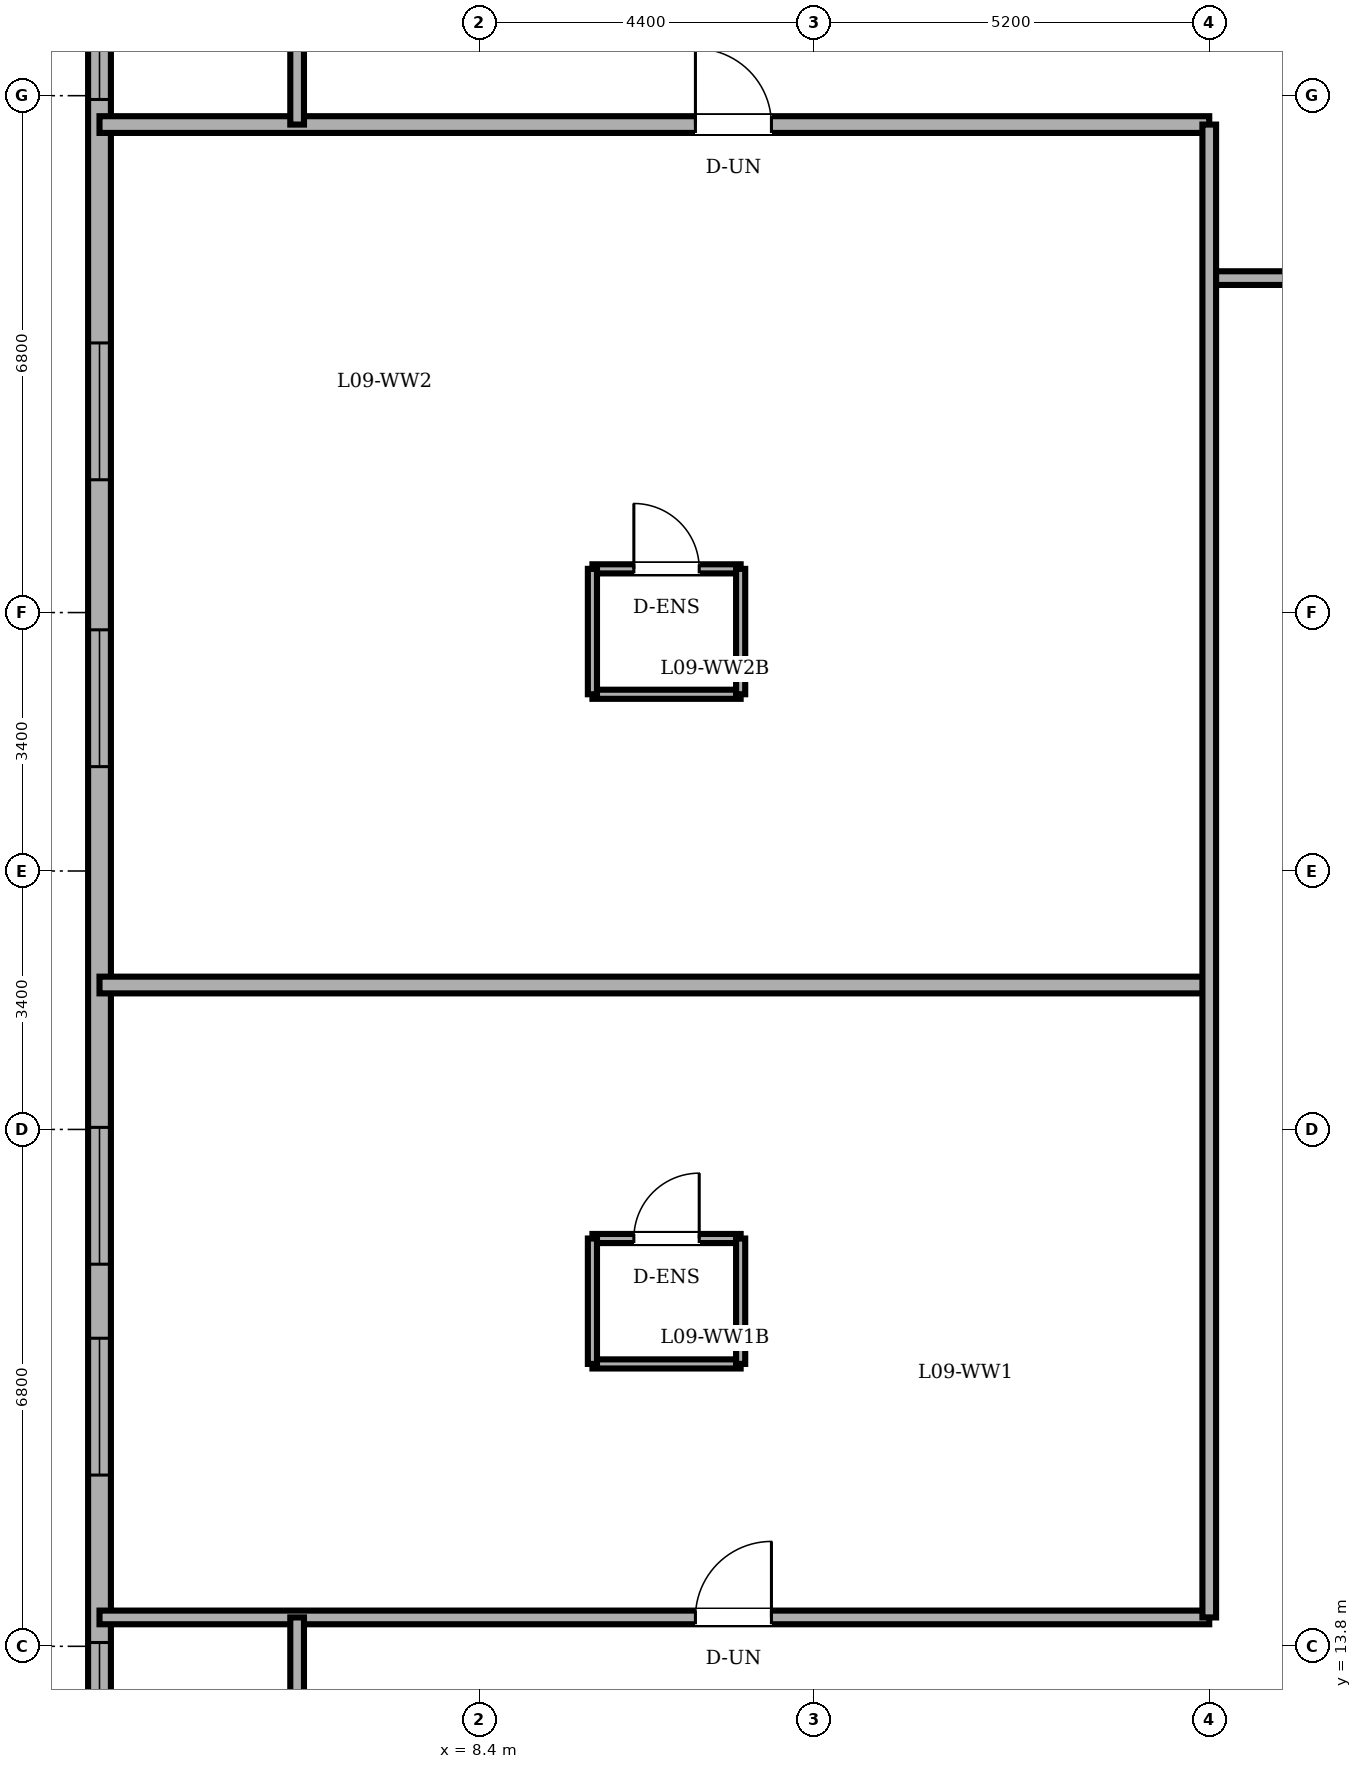
"""IFC4 building model, lengths in metres.
Left out: names, types, materials, properties, quantities, classifications, styles, units other than length and angle.
Written with IfcOpenShell. Run it as: python <this file> out.ifc"""

import sys

from ifc_helpers import new_model, si_unit, direction, frame, frame_2d, origin, place, context, subcontext, project, spatial, rectangle, extrude, element, fill, save


model = new_model("IFC4")
c1 = context("Model", 3, precision=1e-05, world=origin(), true_north=direction((0.0, 1.0)))
c2 = subcontext(c1, "Body", "Model", "MODEL_VIEW")
j1 = project(units=[si_unit("LENGTHUNIT", "METRE"), si_unit("PLANEANGLEUNIT", "RADIAN")], contexts=[c1])
p1 = place(None, origin())
s1 = spatial("IfcSite", under=j1, at=p1, CompositionType="ELEMENT")
p2 = place(p1, origin())
s2 = spatial("IfcBuilding", under=s1, at=p2, CompositionType="ELEMENT")
p3 = place(p2, frame((0.0, 0.0, 36.0)))
s3 = spatial("IfcBuildingStorey", under=s2, at=p3, CompositionType="ELEMENT", Elevation=36.0)
p4 = place(p3, frame((3.4, 40.2, 0.0), z_axis=(0.0, 0.0, 1.0), x_axis=(0.0, -1.0, 0.0)))
e1 = element("IfcWall", 1, at=p4, inside=s3, PredefinedType="SOLIDWALL", context=c2, shape_type="SweptSolid", body=[
    extrude(rectangle(XDim=32.4, YDim=0.3, at=frame_2d((16.2, 0.0))), origin(), (0.0, 0.0, 1.0), 3.4),
])
p5 = place(p4, frame((1.235, 0.0, 0.85)))
e2 = element("IfcOpeningElement", 2, at=p5, cuts=e1, PredefinedType="OPENING", context=c2, shape_type="SweptSolid", body=[
    extrude(rectangle(XDim=1.8, YDim=1.55, at=frame_2d((0.9, 0.775))), frame((0.0, 0.16, 0.0), z_axis=(0.0, -1.0, 0.0), x_axis=(1.0, 0.0, 0.0)), (0.0, 0.0, 1.0), 0.32),
])
p6 = place(p4, frame((4.25, 0.0, 0.85)))
e3 = element("IfcOpeningElement", 3, at=p6, cuts=e1, PredefinedType="OPENING", context=c2, shape_type="SweptSolid", body=[
    extrude(rectangle(XDim=1.8, YDim=1.55, at=frame_2d((0.9, 0.775))), frame((0.0, 0.16, 0.0), z_axis=(0.0, -1.0, 0.0), x_axis=(1.0, 0.0, 0.0)), (0.0, 0.0, 1.0), 0.32),
])
p7 = place(p4, frame((9.253, 0.0, 0.85)))
e4 = element("IfcOpeningElement", 4, at=p7, cuts=e1, PredefinedType="OPENING", context=c2, shape_type="SweptSolid", body=[
    extrude(rectangle(XDim=1.8, YDim=1.55, at=frame_2d((0.9, 0.775))), frame((0.0, 0.16, 0.0), z_axis=(0.0, -1.0, 0.0), x_axis=(1.0, 0.0, 0.0)), (0.0, 0.0, 1.0), 0.32),
])
p8 = place(p4, frame((13.027, 0.0, 0.85)))
e5 = element("IfcOpeningElement", 5, at=p8, cuts=e1, PredefinedType="OPENING", context=c2, shape_type="SweptSolid", body=[
    extrude(rectangle(XDim=1.8, YDim=1.55, at=frame_2d((0.9, 0.775))), frame((0.0, 0.16, 0.0), z_axis=(0.0, -1.0, 0.0), x_axis=(1.0, 0.0, 0.0)), (0.0, 0.0, 1.0), 0.32),
])
p9 = place(p4, frame((19.573, 0.0, 0.85)))
e6 = element("IfcOpeningElement", 6, at=p9, cuts=e1, PredefinedType="OPENING", context=c2, shape_type="SweptSolid", body=[
    extrude(rectangle(XDim=1.8, YDim=1.55, at=frame_2d((0.9, 0.775))), frame((0.0, 0.16, 0.0), z_axis=(0.0, -1.0, 0.0), x_axis=(1.0, 0.0, 0.0)), (0.0, 0.0, 1.0), 0.32),
])
p10 = place(p4, frame((22.347, 0.0, 0.85)))
e7 = element("IfcOpeningElement", 7, at=p10, cuts=e1, PredefinedType="OPENING", context=c2, shape_type="SweptSolid", body=[
    extrude(rectangle(XDim=1.8, YDim=1.55, at=frame_2d((0.9, 0.775))), frame((0.0, 0.16, 0.0), z_axis=(0.0, -1.0, 0.0), x_axis=(1.0, 0.0, 0.0)), (0.0, 0.0, 1.0), 0.32),
])
p11 = place(p4, frame((26.35, 0.0, 0.85)))
e8 = element("IfcOpeningElement", 8, at=p11, cuts=e1, PredefinedType="OPENING", context=c2, shape_type="SweptSolid", body=[
    extrude(rectangle(XDim=1.8, YDim=1.55, at=frame_2d((0.9, 0.775))), frame((0.0, 0.16, 0.0), z_axis=(0.0, -1.0, 0.0), x_axis=(1.0, 0.0, 0.0)), (0.0, 0.0, 1.0), 0.32),
])
p12 = place(p4, frame((29.365, 0.0, 0.85)))
e9 = element("IfcOpeningElement", 9, at=p12, cuts=e1, PredefinedType="OPENING", context=c2, shape_type="SweptSolid", body=[
    extrude(rectangle(XDim=1.8, YDim=1.55, at=frame_2d((0.9, 0.775))), frame((0.0, 0.16, 0.0), z_axis=(0.0, -1.0, 0.0), x_axis=(1.0, 0.0, 0.0)), (0.0, 0.0, 1.0), 0.32),
])
p13 = place(p3, frame((9.885, 19.165, 0.0), z_axis=(0.0, 0.0, 1.0), x_axis=(1.0, 0.0, 0.0)))
e10 = element("IfcWall", 10, at=p13, inside=s3, PredefinedType="PARTITIONING", context=c2, shape_type="SweptSolid", body=[
    extrude(rectangle(XDim=1.95, YDim=0.12, at=frame_2d((0.975, 0.0))), origin(), (0.0, 0.0, 1.0), 3.4),
])
p14 = place(p13, frame((0.545, 0.0, 0.0)))
e11 = element("IfcOpeningElement", 11, at=p14, cuts=e10, PredefinedType="OPENING", context=c2, shape_type="SweptSolid", body=[
    extrude(rectangle(XDim=0.86, YDim=2.1, at=frame_2d((0.43, 1.05))), frame((0.0, 0.07, 0.0), z_axis=(0.0, -1.0, 0.0), x_axis=(1.0, 0.0, 0.0)), (0.0, 0.0, 1.0), 0.14),
])
p15 = place(p3, frame((11.835, 17.515, 0.0), z_axis=(0.0, 0.0, 1.0), x_axis=(-1.0, 0.0, 0.0)))
e12 = element("IfcWall", 12, at=p15, inside=s3, PredefinedType="PARTITIONING", context=c2, shape_type="SweptSolid", body=[
    extrude(rectangle(XDim=1.95, YDim=0.12, at=frame_2d((0.975, 0.0))), origin(), (0.0, 0.0, 1.0), 3.4),
])
for number, where, z_axis, x_axis in (
    (13, (9.885, 19.165, 0.0), (0.0, 0.0, 1.0), (0.0, -1.0, 0.0)),
    (14, (11.835, 17.515, 0.0), (0.0, 0.0, 1.0), (0.0, 1.0, 0.0)),
):
    element("IfcWall", number, at=place(p3, frame(where, z_axis=z_axis, x_axis=x_axis)), inside=s3, PredefinedType="PARTITIONING", context=c2, shape_type="SweptSolid", body=[
        extrude(rectangle(XDim=1.65, YDim=0.12, at=frame_2d((0.825, 0.0))), origin(), (0.0, 0.0, 1.0), 3.4),
    ])
p16 = place(p3, frame((9.885, 27.975, 0.0), z_axis=(0.0, 0.0, 1.0), x_axis=(1.0, 0.0, 0.0)))
e15 = element("IfcWall", 15, at=p16, inside=s3, PredefinedType="PARTITIONING", context=c2, shape_type="SweptSolid", body=[
    extrude(rectangle(XDim=1.95, YDim=0.12, at=frame_2d((0.975, 0.0))), origin(), (0.0, 0.0, 1.0), 3.4),
])
p17 = place(p16, frame((0.545, 0.0, 0.0)))
e16 = element("IfcOpeningElement", 16, at=p17, cuts=e15, PredefinedType="OPENING", context=c2, shape_type="SweptSolid", body=[
    extrude(rectangle(XDim=0.86, YDim=2.1, at=frame_2d((0.43, 1.05))), frame((0.0, 0.07, 0.0), z_axis=(0.0, -1.0, 0.0), x_axis=(1.0, 0.0, 0.0)), (0.0, 0.0, 1.0), 0.14),
])
p18 = place(p3, frame((11.835, 26.325, 0.0), z_axis=(0.0, 0.0, 1.0), x_axis=(-1.0, 0.0, 0.0)))
e17 = element("IfcWall", 17, at=p18, inside=s3, PredefinedType="PARTITIONING", context=c2, shape_type="SweptSolid", body=[
    extrude(rectangle(XDim=1.95, YDim=0.12, at=frame_2d((0.975, 0.0))), origin(), (0.0, 0.0, 1.0), 3.4),
])
for number, where, z_axis, x_axis in (
    (18, (9.885, 27.975, 0.0), (0.0, 0.0, 1.0), (0.0, -1.0, 0.0)),
    (19, (11.835, 26.325, 0.0), (0.0, 0.0, 1.0), (0.0, 1.0, 0.0)),
):
    element("IfcWall", number, at=place(p3, frame(where, z_axis=z_axis, x_axis=x_axis)), inside=s3, PredefinedType="PARTITIONING", context=c2, shape_type="SweptSolid", body=[
        extrude(rectangle(XDim=1.65, YDim=0.12, at=frame_2d((0.825, 0.0))), origin(), (0.0, 0.0, 1.0), 3.4),
    ])
p19 = place(p3, frame((3.4, 14.18, 0.0), z_axis=(0.0, 0.0, 1.0), x_axis=(1.0, 0.0, 0.0)))
e20 = element("IfcWall", 20, at=p19, inside=s3, PredefinedType="PARTITIONING", context=c2, shape_type="SweptSolid", body=[
    extrude(rectangle(XDim=14.6, YDim=0.18, at=frame_2d((7.3, 0.0))), origin(), (0.0, 0.0, 1.0), 3.4),
])
p20 = place(p19, frame((7.84, 0.0, 0.0)))
e21 = element("IfcOpeningElement", 21, at=p20, cuts=e20, PredefinedType="OPENING", context=c2, shape_type="SweptSolid", body=[
    extrude(rectangle(XDim=1.0, YDim=2.15, at=frame_2d((0.5, 1.075))), frame((0.0, 0.1, 0.0), z_axis=(0.0, -1.0, 0.0), x_axis=(1.0, 0.0, 0.0)), (0.0, 0.0, 1.0), 0.2),
])
p21 = place(p3, frame((3.4, 22.5, 0.0), z_axis=(0.0, 0.0, 1.0), x_axis=(1.0, 0.0, 0.0)))
e22 = element("IfcWall", 22, at=p21, inside=s3, PredefinedType="PARTITIONING", context=c2, shape_type="SweptSolid", body=[
    extrude(rectangle(XDim=14.6, YDim=0.22, at=frame_2d((7.3, 0.0))), origin(), (0.0, 0.0, 1.0), 3.4),
])
p22 = place(p3, frame((18.0, 31.8, 0.0), z_axis=(0.0, 0.0, 1.0), x_axis=(1.0, 0.0, 0.0)))
e23 = element("IfcWall", 23, at=p22, inside=s3, PredefinedType="PARTITIONING", context=c2, shape_type="SweptSolid", body=[
    extrude(rectangle(XDim=2.35, YDim=0.18, at=frame_2d((1.175, 0.0))), origin(), (0.0, 0.0, 1.0), 3.4),
])
p23 = place(p3, frame((3.4, 33.82, 0.0), z_axis=(0.0, 0.0, 1.0), x_axis=(1.0, 0.0, 0.0)))
e24 = element("IfcWall", 24, at=p23, inside=s3, PredefinedType="PARTITIONING", context=c2, shape_type="SweptSolid", body=[
    extrude(rectangle(XDim=14.6, YDim=0.22, at=frame_2d((7.3, 0.0))), origin(), (0.0, 0.0, 1.0), 3.4),
])
p24 = place(p23, frame((7.84, 0.0, 0.0)))
e25 = element("IfcOpeningElement", 25, at=p24, cuts=e24, PredefinedType="OPENING", context=c2, shape_type="SweptSolid", body=[
    extrude(rectangle(XDim=1.0, YDim=2.15, at=frame_2d((0.5, 1.075))), frame((0.0, 0.12, 0.0), z_axis=(0.0, -1.0, 0.0), x_axis=(1.0, 0.0, 0.0)), (0.0, 0.0, 1.0), 0.24),
])
for number, where, z_axis, x_axis in (
    (26, (6.0, 11.72, 0.0), (0.0, 0.0, 1.0), (0.0, 1.0, 0.0)),
    (27, (6.0, 33.82, 0.0), (0.0, 0.0, 1.0), (0.0, 1.0, 0.0)),
):
    element("IfcWall", number, at=place(p3, frame(where, z_axis=z_axis, x_axis=x_axis)), inside=s3, PredefinedType="PARTITIONING", context=c2, shape_type="SweptSolid", body=[
        extrude(rectangle(XDim=2.46, YDim=0.18, at=frame_2d((1.23, 0.0))), origin(), (0.0, 0.0, 1.0), 3.4),
    ])
p25 = place(p3, frame((18.0, 14.18, 0.0), z_axis=(0.0, 0.0, 1.0), x_axis=(0.0, 1.0, 0.0)))
e28 = element("IfcWall", 28, at=p25, inside=s3, PredefinedType="PARTITIONING", context=c2, shape_type="SweptSolid", body=[
    extrude(rectangle(XDim=19.64, YDim=0.18, at=frame_2d((9.82, 0.0))), origin(), (0.0, 0.0, 1.0), 3.4),
])
p26 = place(p6, origin())
e29 = element("IfcWindow", 29, at=p26, inside=s3, PartitioningType="DOUBLE_PANEL_VERTICAL", PredefinedType="WINDOW", context=c2, shape_type="SweptSolid", body=[
    extrude(rectangle(XDim=1.8, YDim=1.55, at=frame_2d((0.9, 0.775))), frame((0.0, 0.03, 0.0), z_axis=(0.0, -1.0, 0.0), x_axis=(1.0, 0.0, 0.0)), (0.0, 0.0, 1.0), 0.06),
])
fill(e3, e29)
p27 = place(p7, origin())
e30 = element("IfcWindow", 30, at=p27, inside=s3, PartitioningType="DOUBLE_PANEL_VERTICAL", PredefinedType="WINDOW", context=c2, shape_type="SweptSolid", body=[
    extrude(rectangle(XDim=1.8, YDim=1.55, at=frame_2d((0.9, 0.775))), frame((0.0, 0.03, 0.0), z_axis=(0.0, -1.0, 0.0), x_axis=(1.0, 0.0, 0.0)), (0.0, 0.0, 1.0), 0.06),
])
fill(e4, e30)
p28 = place(p8, origin())
e31 = element("IfcWindow", 31, at=p28, inside=s3, PartitioningType="DOUBLE_PANEL_VERTICAL", PredefinedType="WINDOW", context=c2, shape_type="SweptSolid", body=[
    extrude(rectangle(XDim=1.8, YDim=1.55, at=frame_2d((0.9, 0.775))), frame((0.0, 0.03, 0.0), z_axis=(0.0, -1.0, 0.0), x_axis=(1.0, 0.0, 0.0)), (0.0, 0.0, 1.0), 0.06),
])
fill(e5, e31)
p29 = place(p9, origin())
e32 = element("IfcWindow", 32, at=p29, inside=s3, PartitioningType="DOUBLE_PANEL_VERTICAL", PredefinedType="WINDOW", context=c2, shape_type="SweptSolid", body=[
    extrude(rectangle(XDim=1.8, YDim=1.55, at=frame_2d((0.9, 0.775))), frame((0.0, 0.03, 0.0), z_axis=(0.0, -1.0, 0.0), x_axis=(1.0, 0.0, 0.0)), (0.0, 0.0, 1.0), 0.06),
])
fill(e6, e32)
p30 = place(p10, origin())
e33 = element("IfcWindow", 33, at=p30, inside=s3, PartitioningType="DOUBLE_PANEL_VERTICAL", PredefinedType="WINDOW", context=c2, shape_type="SweptSolid", body=[
    extrude(rectangle(XDim=1.8, YDim=1.55, at=frame_2d((0.9, 0.775))), frame((0.0, 0.03, 0.0), z_axis=(0.0, -1.0, 0.0), x_axis=(1.0, 0.0, 0.0)), (0.0, 0.0, 1.0), 0.06),
])
fill(e7, e33)
p31 = place(p11, origin())
e34 = element("IfcWindow", 34, at=p31, inside=s3, PartitioningType="DOUBLE_PANEL_VERTICAL", PredefinedType="WINDOW", context=c2, shape_type="SweptSolid", body=[
    extrude(rectangle(XDim=1.8, YDim=1.55, at=frame_2d((0.9, 0.775))), frame((0.0, 0.03, 0.0), z_axis=(0.0, -1.0, 0.0), x_axis=(1.0, 0.0, 0.0)), (0.0, 0.0, 1.0), 0.06),
])
fill(e8, e34)
p32 = place(p14, origin())
e35 = element("IfcDoor", 35, at=p32, inside=s3, OperationType="SINGLE_SWING_RIGHT", PredefinedType="DOOR", context=c2, shape_type="SweptSolid", body=[
    extrude(rectangle(XDim=0.86, YDim=2.1, at=frame_2d((0.43, 1.05))), frame((0.0, 0.025, 0.0), z_axis=(0.0, -1.0, 0.0), x_axis=(1.0, 0.0, 0.0)), (0.0, 0.0, 1.0), 0.05),
])
fill(e11, e35)
p33 = place(p17, origin())
e36 = element("IfcDoor", 36, at=p33, inside=s3, OperationType="SINGLE_SWING_LEFT", PredefinedType="DOOR", context=c2, shape_type="SweptSolid", body=[
    extrude(rectangle(XDim=0.86, YDim=2.1, at=frame_2d((0.43, 1.05))), frame((0.0, 0.025, 0.0), z_axis=(0.0, -1.0, 0.0), x_axis=(1.0, 0.0, 0.0)), (0.0, 0.0, 1.0), 0.05),
])
fill(e16, e36)
p34 = place(p20, origin())
e37 = element("IfcDoor", 37, at=p34, inside=s3, OperationType="SINGLE_SWING_RIGHT", PredefinedType="DOOR", context=c2, shape_type="SweptSolid", body=[
    extrude(rectangle(XDim=1.0, YDim=2.15, at=frame_2d((0.5, 1.075))), frame((0.0, 0.025, 0.0), z_axis=(0.0, -1.0, 0.0), x_axis=(1.0, 0.0, 0.0)), (0.0, 0.0, 1.0), 0.05),
])
fill(e21, e37)
p35 = place(p24, origin())
e38 = element("IfcDoor", 38, at=p35, inside=s3, OperationType="SINGLE_SWING_LEFT", PredefinedType="DOOR", context=c2, shape_type="SweptSolid", body=[
    extrude(rectangle(XDim=1.0, YDim=2.15, at=frame_2d((0.5, 1.075))), frame((0.0, 0.025, 0.0), z_axis=(0.0, -1.0, 0.0), x_axis=(1.0, 0.0, 0.0)), (0.0, 0.0, 1.0), 0.05),
])
fill(e25, e38)
save(model, sys.argv[1])
